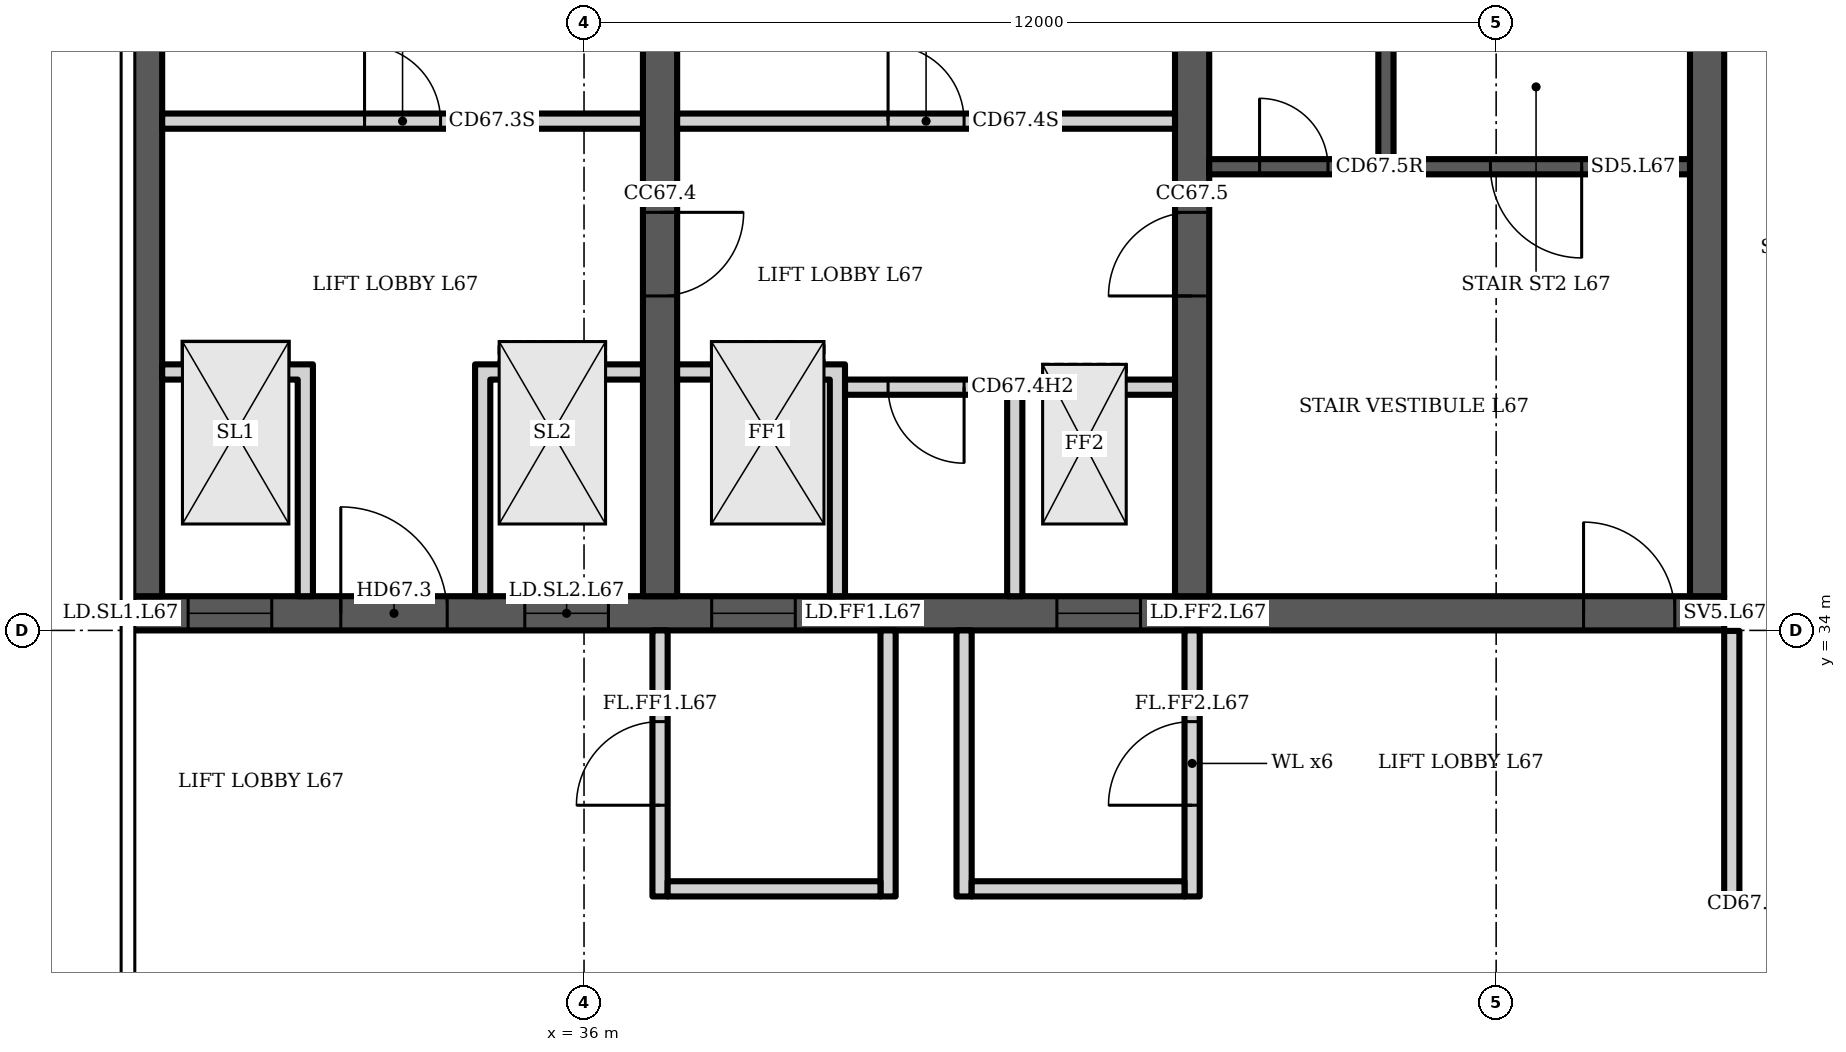
"""IFC4 building model, lengths in metres.
Left out: names, types, materials, properties, quantities, classifications, styles, units other than length and angle.
Written with IfcOpenShell. Run it as: python <this file> out.ifc"""

import sys

from ifc_helpers import new_model, si_unit, direction, frame, frame_2d, origin, place, context, subcontext, project, spatial, polyline, rectangle, outline, extrude, element, fill, save


model = new_model("IFC4")
c1 = context("Model", 3, precision=1e-05, world=origin(), true_north=direction((0.0, 1.0)))
c2 = subcontext(c1, "Body", "Model", "MODEL_VIEW")
j1 = project(units=[si_unit("LENGTHUNIT", "METRE"), si_unit("PLANEANGLEUNIT", "RADIAN")], contexts=[c1])
p1 = place(None, origin())
s1 = spatial("IfcSite", under=j1, at=p1, CompositionType="ELEMENT")
p2 = place(p1, origin())
s2 = spatial("IfcBuilding", under=s1, at=p2, CompositionType="ELEMENT")
p3 = place(p2, frame((0.0, 0.0, 264.3)))
s3 = spatial("IfcBuildingStorey", under=s2, at=p3, CompositionType="ELEMENT", Elevation=264.3)
p4 = place(p3, frame((30.0, 34.225, 0.0), z_axis=(0.0, 0.0, 1.0), x_axis=(1.0, 0.0, 0.0)))
e1 = element("IfcWall", 1, at=p4, inside=s3, PredefinedType="SHEAR", context=c2, shape_type="SweptSolid", body=[
    extrude(outline(polyline([(0.0, 0.0), (21.0, 0.0), (21.0, 3.2), (18.375, 3.2), (15.75, 3.2), (13.125, 3.2), (10.5, 3.2), (7.875, 3.2), (5.25, 3.2), (2.625, 3.054), (0.0, 2.25), (0.0, 0.0)])), frame((0.0, 0.225, 0.0), z_axis=(0.0, -1.0, 0.0), x_axis=(1.0, 0.0, 0.0)), (0.0, 0.0, 1.0), 0.45),
])
p5 = place(p4, frame((0.792, 0.0, 0.0)))
e2 = element("IfcOpeningElement", 2, at=p5, cuts=e1, PredefinedType="OPENING", context=c2, shape_type="SweptSolid", body=[
    extrude(rectangle(XDim=1.1, YDim=2.1, at=frame_2d((0.55, 1.05))), frame((0.0, 0.235, 0.0), z_axis=(0.0, -1.0, 0.0), x_axis=(1.0, 0.0, 0.0)), (0.0, 0.0, 1.0), 0.47),
])
p6 = place(p4, frame((5.221, 0.0, 0.0)))
e3 = element("IfcOpeningElement", 3, at=p6, cuts=e1, PredefinedType="OPENING", context=c2, shape_type="SweptSolid", body=[
    extrude(rectangle(XDim=1.1, YDim=2.1, at=frame_2d((0.55, 1.05))), frame((0.0, 0.235, 0.0), z_axis=(0.0, -1.0, 0.0), x_axis=(1.0, 0.0, 0.0)), (0.0, 0.0, 1.0), 0.47),
])
p7 = place(p4, frame((2.8, 0.0, 0.0)))
e4 = element("IfcOpeningElement", 4, at=p7, cuts=e1, PredefinedType="OPENING", context=c2, shape_type="SweptSolid", body=[
    extrude(rectangle(XDim=1.4, YDim=2.1, at=frame_2d((0.7, 1.05))), frame((0.0, 0.235, 0.0), z_axis=(0.0, -1.0, 0.0), x_axis=(1.0, 0.0, 0.0)), (0.0, 0.0, 1.0), 0.47),
])
p8 = place(p4, frame((7.679, 0.0, 0.0)))
e5 = element("IfcOpeningElement", 5, at=p8, cuts=e1, PredefinedType="OPENING", context=c2, shape_type="SweptSolid", body=[
    extrude(rectangle(XDim=1.1, YDim=2.1, at=frame_2d((0.55, 1.05))), frame((0.0, 0.235, 0.0), z_axis=(0.0, -1.0, 0.0), x_axis=(1.0, 0.0, 0.0)), (0.0, 0.0, 1.0), 0.47),
])
p9 = place(p4, frame((12.221, 0.0, 0.0)))
e6 = element("IfcOpeningElement", 6, at=p9, cuts=e1, PredefinedType="OPENING", context=c2, shape_type="SweptSolid", body=[
    extrude(rectangle(XDim=1.1, YDim=2.1, at=frame_2d((0.55, 1.05))), frame((0.0, 0.235, 0.0), z_axis=(0.0, -1.0, 0.0), x_axis=(1.0, 0.0, 0.0)), (0.0, 0.0, 1.0), 0.47),
])
p10 = place(p4, frame((19.15, 0.0, 0.0)))
e7 = element("IfcOpeningElement", 7, at=p10, cuts=e1, PredefinedType="OPENING", context=c2, shape_type="SweptSolid", body=[
    extrude(rectangle(XDim=1.2, YDim=2.1, at=frame_2d((0.6, 1.05))), frame((0.0, 0.235, 0.0), z_axis=(0.0, -1.0, 0.0), x_axis=(1.0, 0.0, 0.0)), (0.0, 0.0, 1.0), 0.47),
])
p11 = place(p3, frame((30.225, 34.45, 0.0), z_axis=(0.0, 0.0, 1.0), x_axis=(0.0, 1.0, 0.0)))
e8 = element("IfcWall", 8, at=p11, inside=s3, PredefinedType="SHEAR", context=c2, shape_type="SweptSolid", body=[
    extrude(rectangle(XDim=14.498, YDim=0.45, at=frame_2d((7.249, 0.0))), origin(), (0.0, 0.0, 1.0), 2.085),
])
p12 = place(p3, frame((37.0, 34.45, 0.0), z_axis=(0.0, 0.0, 1.0), x_axis=(0.0, 1.0, 0.0)))
e9 = element("IfcWall", 9, at=p12, inside=s3, PredefinedType="SHEAR", context=c2, shape_type="SweptSolid", body=[
    extrude(rectangle(XDim=15.091, YDim=0.45, at=frame_2d((7.545, 0.0))), origin(), (0.0, 0.0, 1.0), 3.2),
])
p13 = place(p12, frame((3.95, 0.0, 0.0)))
e10 = element("IfcOpeningElement", 10, at=p13, cuts=e9, PredefinedType="OPENING", context=c2, shape_type="SweptSolid", body=[
    extrude(rectangle(XDim=1.1, YDim=2.1, at=frame_2d((0.55, 1.05))), frame((0.0, 0.235, 0.0), z_axis=(0.0, -1.0, 0.0), x_axis=(1.0, 0.0, 0.0)), (0.0, 0.0, 1.0), 0.47),
])
p14 = place(p12, frame((10.35, 0.0, 0.0)))
e11 = element("IfcOpeningElement", 11, at=p14, cuts=e9, PredefinedType="OPENING", context=c2, shape_type="SweptSolid", body=[
    extrude(rectangle(XDim=1.0, YDim=2.1, at=frame_2d((0.5, 1.05))), frame((0.0, 0.235, 0.0), z_axis=(0.0, -1.0, 0.0), x_axis=(1.0, 0.0, 0.0)), (0.0, 0.0, 1.0), 0.47),
])
p15 = place(p3, frame((44.0, 34.45, 0.0), z_axis=(0.0, 0.0, 1.0), x_axis=(0.0, 1.0, 0.0)))
e12 = element("IfcWall", 12, at=p15, inside=s3, PredefinedType="SHEAR", context=c2, shape_type="SweptSolid", body=[
    extrude(rectangle(XDim=14.479, YDim=0.45, at=frame_2d((7.239, 0.0))), origin(), (0.0, 0.0, 1.0), 3.2),
])
p16 = place(p15, frame((3.95, 0.0, 0.0)))
e13 = element("IfcOpeningElement", 13, at=p16, cuts=e12, PredefinedType="OPENING", context=c2, shape_type="SweptSolid", body=[
    extrude(rectangle(XDim=1.1, YDim=2.1, at=frame_2d((0.55, 1.05))), frame((0.0, 0.235, 0.0), z_axis=(0.0, -1.0, 0.0), x_axis=(1.0, 0.0, 0.0)), (0.0, 0.0, 1.0), 0.47),
])
p17 = place(p15, frame((10.35, 0.0, 0.0)))
e14 = element("IfcOpeningElement", 14, at=p17, cuts=e12, PredefinedType="OPENING", context=c2, shape_type="SweptSolid", body=[
    extrude(rectangle(XDim=1.0, YDim=2.1, at=frame_2d((0.5, 1.05))), frame((0.0, 0.235, 0.0), z_axis=(0.0, -1.0, 0.0), x_axis=(1.0, 0.0, 0.0)), (0.0, 0.0, 1.0), 0.47),
])
p18 = place(p3, frame((50.775, 34.45, 0.0), z_axis=(0.0, 0.0, 1.0), x_axis=(0.0, 1.0, 0.0)))
e15 = element("IfcWall", 15, at=p18, inside=s3, PredefinedType="SHEAR", context=c2, shape_type="SweptSolid", body=[
    extrude(rectangle(XDim=13.886, YDim=0.45, at=frame_2d((6.943, 0.0))), origin(), (0.0, 0.0, 1.0), 3.2),
])
p19 = place(p3, frame((30.45, 40.7, 0.0), z_axis=(0.0, 0.0, 1.0), x_axis=(1.0, 0.0, 0.0)))
e16 = element("IfcWall", 16, at=p19, inside=s3, PredefinedType="PARTITIONING", context=c2, shape_type="SweptSolid", body=[
    extrude(rectangle(XDim=6.325, YDim=0.2, at=frame_2d((3.163, 0.0))), origin(), (0.0, 0.0, 1.0), 2.8),
])
p20 = place(p19, frame((2.663, 0.0, 0.0)))
e17 = element("IfcOpeningElement", 17, at=p20, cuts=e16, PredefinedType="OPENING", context=c2, shape_type="SweptSolid", body=[
    extrude(rectangle(XDim=1.0, YDim=2.1, at=frame_2d((0.5, 1.05))), frame((0.0, 0.11, 0.0), z_axis=(0.0, -1.0, 0.0), x_axis=(1.0, 0.0, 0.0)), (0.0, 0.0, 1.0), 0.22),
])
p21 = place(p3, origin())
e18 = element("IfcWall", 18, at=p21, inside=s3, PredefinedType="PARTITIONING", context=c2, shape_type="SweptSolid", body=[
    extrude(outline(polyline([(32.233, 37.3), (30.45, 37.3), (30.45, 37.5), (32.233, 37.5), (32.433, 37.5), (32.433, 34.45), (32.233, 34.45), (32.233, 37.3)])), origin(), (0.0, 0.0, 1.0), 2.8),
])
p22 = place(p3, origin())
e19 = element("IfcWall", 19, at=p22, inside=s3, PredefinedType="PARTITIONING", context=c2, shape_type="SweptSolid", body=[
    extrude(outline(polyline([(34.567, 37.5), (34.767, 37.5), (36.775, 37.5), (36.775, 37.3), (34.767, 37.3), (34.767, 34.45), (34.567, 34.45), (34.567, 37.5)])), origin(), (0.0, 0.0, 1.0), 2.8),
])
p23 = place(p3, frame((39.433, 37.2, 0.0), z_axis=(0.0, 0.0, 1.0), x_axis=(1.0, 0.0, 0.0)))
e20 = element("IfcWall", 20, at=p23, inside=s3, PredefinedType="PARTITIONING", context=c2, shape_type="SweptSolid", body=[
    extrude(rectangle(XDim=2.133, YDim=0.2, at=frame_2d((1.067, 0.0))), origin(), (0.0, 0.0, 1.0), 2.8),
])
p24 = place(p23, frame((0.567, 0.0, 0.0)))
e21 = element("IfcOpeningElement", 21, at=p24, cuts=e20, PredefinedType="OPENING", context=c2, shape_type="SweptSolid", body=[
    extrude(rectangle(XDim=1.0, YDim=2.1, at=frame_2d((0.5, 1.05))), frame((0.0, 0.11, 0.0), z_axis=(0.0, -1.0, 0.0), x_axis=(1.0, 0.0, 0.0)), (0.0, 0.0, 1.0), 0.22),
])
p25 = place(p3, frame((37.225, 40.7, 0.0), z_axis=(0.0, 0.0, 1.0), x_axis=(1.0, 0.0, 0.0)))
e22 = element("IfcWall", 22, at=p25, inside=s3, PredefinedType="PARTITIONING", context=c2, shape_type="SweptSolid", body=[
    extrude(rectangle(XDim=6.55, YDim=0.2, at=frame_2d((3.275, 0.0))), origin(), (0.0, 0.0, 1.0), 2.8),
])
p26 = place(p25, frame((2.775, 0.0, 0.0)))
e23 = element("IfcOpeningElement", 23, at=p26, cuts=e22, PredefinedType="OPENING", context=c2, shape_type="SweptSolid", body=[
    extrude(rectangle(XDim=1.0, YDim=2.1, at=frame_2d((0.5, 1.05))), frame((0.0, 0.11, 0.0), z_axis=(0.0, -1.0, 0.0), x_axis=(1.0, 0.0, 0.0)), (0.0, 0.0, 1.0), 0.22),
])
p27 = place(p3, origin())
e24 = element("IfcWall", 24, at=p27, inside=s3, PredefinedType="PARTITIONING", context=c2, shape_type="SweptSolid", body=[
    extrude(outline(polyline([(41.567, 37.3), (41.767, 37.3), (43.775, 37.3), (43.775, 37.1), (41.767, 37.1), (41.767, 34.45), (41.567, 34.45), (41.567, 37.3)])), origin(), (0.0, 0.0, 1.0), 2.8),
])
p28 = place(p3, origin())
e25 = element("IfcWall", 25, at=p28, inside=s3, PredefinedType="PARTITIONING", context=c2, shape_type="SweptSolid", body=[
    extrude(outline(polyline([(39.233, 37.3), (37.225, 37.3), (37.225, 37.5), (39.233, 37.5), (39.433, 37.5), (39.433, 34.45), (39.233, 34.45), (39.233, 37.3)])), origin(), (0.0, 0.0, 1.0), 2.8),
])
p29 = place(p3, frame((44.225, 40.1, 0.0), z_axis=(0.0, 0.0, 1.0), x_axis=(1.0, 0.0, 0.0)))
e26 = element("IfcWall", 26, at=p29, inside=s3, PredefinedType="SHEAR", context=c2, shape_type="SweptSolid", body=[
    extrude(rectangle(XDim=6.325, YDim=0.2, at=frame_2d((3.163, 0.0))), origin(), (0.0, 0.0, 1.0), 2.8),
])
p30 = place(p29, frame((3.7, 0.0, 0.0)))
e27 = element("IfcOpeningElement", 27, at=p30, cuts=e26, PredefinedType="OPENING", context=c2, shape_type="SweptSolid", body=[
    extrude(rectangle(XDim=1.2, YDim=2.1, at=frame_2d((0.6, 1.05))), frame((0.0, 0.11, 0.0), z_axis=(0.0, -1.0, 0.0), x_axis=(1.0, 0.0, 0.0)), (0.0, 0.0, 1.0), 0.22),
])
p31 = place(p29, frame((0.663, 0.0, 0.0)))
e28 = element("IfcOpeningElement", 28, at=p31, cuts=e26, PredefinedType="OPENING", context=c2, shape_type="SweptSolid", body=[
    extrude(rectangle(XDim=0.9, YDim=2.1, at=frame_2d((0.45, 1.05))), frame((0.0, 0.11, 0.0), z_axis=(0.0, -1.0, 0.0), x_axis=(1.0, 0.0, 0.0)), (0.0, 0.0, 1.0), 0.22),
])
p32 = place(p3, frame((46.55, 40.2, 0.0), z_axis=(0.0, 0.0, 1.0), x_axis=(0.0, 1.0, 0.0)))
e29 = element("IfcWall", 29, at=p32, inside=s3, PredefinedType="SHEAR", context=c2, shape_type="SweptSolid", body=[
    extrude(rectangle(XDim=7.2, YDim=0.2, at=frame_2d((3.6, 0.0))), origin(), (0.0, 0.0, 1.0), 2.8),
])
p33 = place(p3, frame((53.9, 30.4, 0.0), z_axis=(0.0, 0.0, 1.0), x_axis=(-1.0, 0.0, 0.0)))
e30 = element("IfcWall", 30, at=p33, inside=s3, PredefinedType="PARTITIONING", context=c2, shape_type="SweptSolid", body=[
    extrude(rectangle(XDim=2.8, YDim=0.2, at=frame_2d((1.4, 0.0))), origin(), (0.0, 0.0, 1.0), 2.8),
])
p34 = place(p33, frame((0.9, 0.0, 0.0)))
e31 = element("IfcOpeningElement", 31, at=p34, cuts=e30, PredefinedType="OPENING", context=c2, shape_type="SweptSolid", body=[
    extrude(rectangle(XDim=1.0, YDim=2.1, at=frame_2d((0.5, 1.05))), frame((0.0, 0.11, 0.0), z_axis=(0.0, -1.0, 0.0), x_axis=(1.0, 0.0, 0.0)), (0.0, 0.0, 1.0), 0.22),
])
p35 = place(p3, frame((51.1, 30.4, 0.0), z_axis=(0.0, 0.0, 1.0), x_axis=(0.0, 1.0, 0.0)))
e32 = element("IfcWall", 32, at=p35, inside=s3, PredefinedType="PARTITIONING", context=c2, shape_type="SweptSolid", body=[
    extrude(rectangle(XDim=3.594, YDim=0.2, at=frame_2d((1.797, 0.0))), origin(), (0.0, 0.0, 1.0), 2.8),
])
p36 = place(p3, frame((37.0, 30.5, 0.0), z_axis=(0.0, 0.0, 1.0), x_axis=(0.0, 1.0, 0.0)))
e33 = element("IfcWall", 33, at=p36, inside=s3, PredefinedType="PARTITIONING", context=c2, shape_type="SweptSolid", body=[
    extrude(rectangle(XDim=3.5, YDim=0.2, at=frame_2d((1.75, 0.0))), origin(), (0.0, 0.0, 1.0), 2.8),
])
p37 = place(p36, frame((1.2, 0.0, 0.0)))
e34 = element("IfcOpeningElement", 34, at=p37, cuts=e33, PredefinedType="OPENING", context=c2, shape_type="SweptSolid", body=[
    extrude(rectangle(XDim=1.1, YDim=2.1, at=frame_2d((0.55, 1.05))), frame((0.0, 0.11, 0.0), z_axis=(0.0, -1.0, 0.0), x_axis=(1.0, 0.0, 0.0)), (0.0, 0.0, 1.0), 0.22),
])
p38 = place(p3, frame((40.0, 30.5, 0.0), z_axis=(0.0, 0.0, 1.0), x_axis=(0.0, 1.0, 0.0)))
e35 = element("IfcWall", 35, at=p38, inside=s3, PredefinedType="PARTITIONING", context=c2, shape_type="SweptSolid", body=[
    extrude(rectangle(XDim=3.5, YDim=0.2, at=frame_2d((1.75, 0.0))), origin(), (0.0, 0.0, 1.0), 2.8),
])
p39 = place(p3, frame((37.1, 30.6, 0.0), z_axis=(0.0, 0.0, 1.0), x_axis=(1.0, 0.0, 0.0)))
e36 = element("IfcWall", 36, at=p39, inside=s3, PredefinedType="PARTITIONING", context=c2, shape_type="SweptSolid", body=[
    extrude(rectangle(XDim=2.8, YDim=0.2, at=frame_2d((1.4, 0.0))), origin(), (0.0, 0.0, 1.0), 2.8),
])
p40 = place(p3, frame((41.0, 30.5, 0.0), z_axis=(0.0, 0.0, 1.0), x_axis=(0.0, 1.0, 0.0)))
e37 = element("IfcWall", 37, at=p40, inside=s3, PredefinedType="PARTITIONING", context=c2, shape_type="SweptSolid", body=[
    extrude(rectangle(XDim=3.5, YDim=0.2, at=frame_2d((1.75, 0.0))), origin(), (0.0, 0.0, 1.0), 2.8),
])
p41 = place(p3, frame((44.0, 30.5, 0.0), z_axis=(0.0, 0.0, 1.0), x_axis=(0.0, 1.0, 0.0)))
e38 = element("IfcWall", 38, at=p41, inside=s3, PredefinedType="PARTITIONING", context=c2, shape_type="SweptSolid", body=[
    extrude(rectangle(XDim=3.5, YDim=0.2, at=frame_2d((1.75, 0.0))), origin(), (0.0, 0.0, 1.0), 2.8),
])
p42 = place(p41, frame((1.2, 0.0, 0.0)))
e39 = element("IfcOpeningElement", 39, at=p42, cuts=e38, PredefinedType="OPENING", context=c2, shape_type="SweptSolid", body=[
    extrude(rectangle(XDim=1.1, YDim=2.1, at=frame_2d((0.55, 1.05))), frame((0.0, 0.11, 0.0), z_axis=(0.0, -1.0, 0.0), x_axis=(1.0, 0.0, 0.0)), (0.0, 0.0, 1.0), 0.22),
])
p43 = place(p3, frame((41.1, 30.6, 0.0), z_axis=(0.0, 0.0, 1.0), x_axis=(1.0, 0.0, 0.0)))
e40 = element("IfcWall", 40, at=p43, inside=s3, PredefinedType="PARTITIONING", context=c2, shape_type="SweptSolid", body=[
    extrude(rectangle(XDim=2.8, YDim=0.2, at=frame_2d((1.4, 0.0))), origin(), (0.0, 0.0, 1.0), 2.8),
])
p44 = place(p5, origin())
e41 = element("IfcDoor", 41, at=p44, inside=s3, OperationType="DOUBLE_DOOR_SLIDING", PredefinedType="DOOR", context=c2, shape_type="SweptSolid", body=[
    extrude(rectangle(XDim=1.1, YDim=2.1, at=frame_2d((0.55, 1.05))), frame((0.0, 0.025, 0.0), z_axis=(0.0, -1.0, 0.0), x_axis=(1.0, 0.0, 0.0)), (0.0, 0.0, 1.0), 0.05),
])
fill(e2, e41)
p45 = place(p6, origin())
e42 = element("IfcDoor", 42, at=p45, inside=s3, OperationType="DOUBLE_DOOR_SLIDING", PredefinedType="DOOR", context=c2, shape_type="SweptSolid", body=[
    extrude(rectangle(XDim=1.1, YDim=2.1, at=frame_2d((0.55, 1.05))), frame((0.0, 0.025, 0.0), z_axis=(0.0, -1.0, 0.0), x_axis=(1.0, 0.0, 0.0)), (0.0, 0.0, 1.0), 0.05),
])
fill(e3, e42)
p46 = place(p7, origin())
e43 = element("IfcDoor", 43, at=p46, inside=s3, OperationType="DOUBLE_DOOR_SINGLE_SWING", PredefinedType="DOOR", context=c2, shape_type="SweptSolid", body=[
    extrude(rectangle(XDim=1.4, YDim=2.1, at=frame_2d((0.7, 1.05))), frame((0.0, 0.025, 0.0), z_axis=(0.0, -1.0, 0.0), x_axis=(1.0, 0.0, 0.0)), (0.0, 0.0, 1.0), 0.05),
])
fill(e4, e43)
p47 = place(p20, origin())
e44 = element("IfcDoor", 44, at=p47, inside=s3, OperationType="SINGLE_SWING_LEFT", PredefinedType="DOOR", context=c2, shape_type="SweptSolid", body=[
    extrude(rectangle(XDim=1.0, YDim=2.1, at=frame_2d((0.5, 1.05))), frame((0.0, 0.025, 0.0), z_axis=(0.0, -1.0, 0.0), x_axis=(1.0, 0.0, 0.0)), (0.0, 0.0, 1.0), 0.05),
])
fill(e17, e44)
p48 = place(p24, origin())
e45 = element("IfcDoor", 45, at=p48, inside=s3, OperationType="SINGLE_SWING_RIGHT", PredefinedType="DOOR", context=c2, shape_type="SweptSolid", body=[
    extrude(rectangle(XDim=1.0, YDim=2.1, at=frame_2d((0.5, 1.05))), frame((0.0, 0.025, 0.0), z_axis=(0.0, -1.0, 0.0), x_axis=(1.0, 0.0, 0.0)), (0.0, 0.0, 1.0), 0.05),
])
fill(e21, e45)
p49 = place(p8, origin())
e46 = element("IfcDoor", 46, at=p49, inside=s3, OperationType="DOUBLE_DOOR_SLIDING", PredefinedType="DOOR", context=c2, shape_type="SweptSolid", body=[
    extrude(rectangle(XDim=1.1, YDim=2.1, at=frame_2d((0.55, 1.05))), frame((0.0, 0.025, 0.0), z_axis=(0.0, -1.0, 0.0), x_axis=(1.0, 0.0, 0.0)), (0.0, 0.0, 1.0), 0.05),
])
fill(e5, e46)
p50 = place(p9, origin())
e47 = element("IfcDoor", 47, at=p50, inside=s3, OperationType="DOUBLE_DOOR_SLIDING", PredefinedType="DOOR", context=c2, shape_type="SweptSolid", body=[
    extrude(rectangle(XDim=1.1, YDim=2.1, at=frame_2d((0.55, 1.05))), frame((0.0, 0.025, 0.0), z_axis=(0.0, -1.0, 0.0), x_axis=(1.0, 0.0, 0.0)), (0.0, 0.0, 1.0), 0.05),
])
fill(e6, e47)
p51 = place(p26, origin())
e48 = element("IfcDoor", 48, at=p51, inside=s3, OperationType="SINGLE_SWING_LEFT", PredefinedType="DOOR", context=c2, shape_type="SweptSolid", body=[
    extrude(rectangle(XDim=1.0, YDim=2.1, at=frame_2d((0.5, 1.05))), frame((0.0, 0.025, 0.0), z_axis=(0.0, -1.0, 0.0), x_axis=(1.0, 0.0, 0.0)), (0.0, 0.0, 1.0), 0.05),
])
fill(e23, e48)
p52 = place(p30, origin())
e49 = element("IfcDoor", 49, at=p52, inside=s3, OperationType="SINGLE_SWING_RIGHT", PredefinedType="DOOR", context=c2, shape_type="SweptSolid", body=[
    extrude(rectangle(XDim=1.2, YDim=2.1, at=frame_2d((0.6, 1.05))), frame((0.0, 0.025, 0.0), z_axis=(0.0, -1.0, 0.0), x_axis=(1.0, 0.0, 0.0)), (0.0, 0.0, 1.0), 0.05),
])
fill(e27, e49)
p53 = place(p31, origin())
e50 = element("IfcDoor", 50, at=p53, inside=s3, OperationType="SINGLE_SWING_LEFT", PredefinedType="DOOR", context=c2, shape_type="SweptSolid", body=[
    extrude(rectangle(XDim=0.9, YDim=2.1, at=frame_2d((0.45, 1.05))), frame((0.0, 0.025, 0.0), z_axis=(0.0, -1.0, 0.0), x_axis=(1.0, 0.0, 0.0)), (0.0, 0.0, 1.0), 0.05),
])
fill(e28, e50)
p54 = place(p10, origin())
e51 = element("IfcDoor", 51, at=p54, inside=s3, OperationType="SINGLE_SWING_LEFT", PredefinedType="DOOR", context=c2, shape_type="SweptSolid", body=[
    extrude(rectangle(XDim=1.2, YDim=2.1, at=frame_2d((0.6, 1.05))), frame((0.0, 0.025, 0.0), z_axis=(0.0, -1.0, 0.0), x_axis=(1.0, 0.0, 0.0)), (0.0, 0.0, 1.0), 0.05),
])
fill(e7, e51)
p55 = place(p13, origin())
e52 = element("IfcDoor", 52, at=p55, inside=s3, OperationType="SINGLE_SWING_RIGHT", PredefinedType="DOOR", context=c2, shape_type="SweptSolid", body=[
    extrude(rectangle(XDim=1.1, YDim=2.1, at=frame_2d((0.55, 1.05))), frame((0.0, 0.025, 0.0), z_axis=(0.0, -1.0, 0.0), x_axis=(1.0, 0.0, 0.0)), (0.0, 0.0, 1.0), 0.05),
])
fill(e10, e52)
p56 = place(p16, origin())
e53 = element("IfcDoor", 53, at=p56, inside=s3, OperationType="SINGLE_SWING_LEFT", PredefinedType="DOOR", context=c2, shape_type="SweptSolid", body=[
    extrude(rectangle(XDim=1.1, YDim=2.1, at=frame_2d((0.55, 1.05))), frame((0.0, 0.025, 0.0), z_axis=(0.0, -1.0, 0.0), x_axis=(1.0, 0.0, 0.0)), (0.0, 0.0, 1.0), 0.05),
])
fill(e13, e53)
p57 = place(p37, origin())
e54 = element("IfcDoor", 54, at=p57, inside=s3, OperationType="SINGLE_SWING_LEFT", PredefinedType="DOOR", context=c2, shape_type="SweptSolid", body=[
    extrude(rectangle(XDim=1.1, YDim=2.1, at=frame_2d((0.55, 1.05))), frame((0.0, 0.025, 0.0), z_axis=(0.0, -1.0, 0.0), x_axis=(1.0, 0.0, 0.0)), (0.0, 0.0, 1.0), 0.05),
])
fill(e34, e54)
p58 = place(p42, origin())
e55 = element("IfcDoor", 55, at=p58, inside=s3, OperationType="SINGLE_SWING_LEFT", PredefinedType="DOOR", context=c2, shape_type="SweptSolid", body=[
    extrude(rectangle(XDim=1.1, YDim=2.1, at=frame_2d((0.55, 1.05))), frame((0.0, 0.025, 0.0), z_axis=(0.0, -1.0, 0.0), x_axis=(1.0, 0.0, 0.0)), (0.0, 0.0, 1.0), 0.05),
])
fill(e39, e55)
save(model, sys.argv[1])
